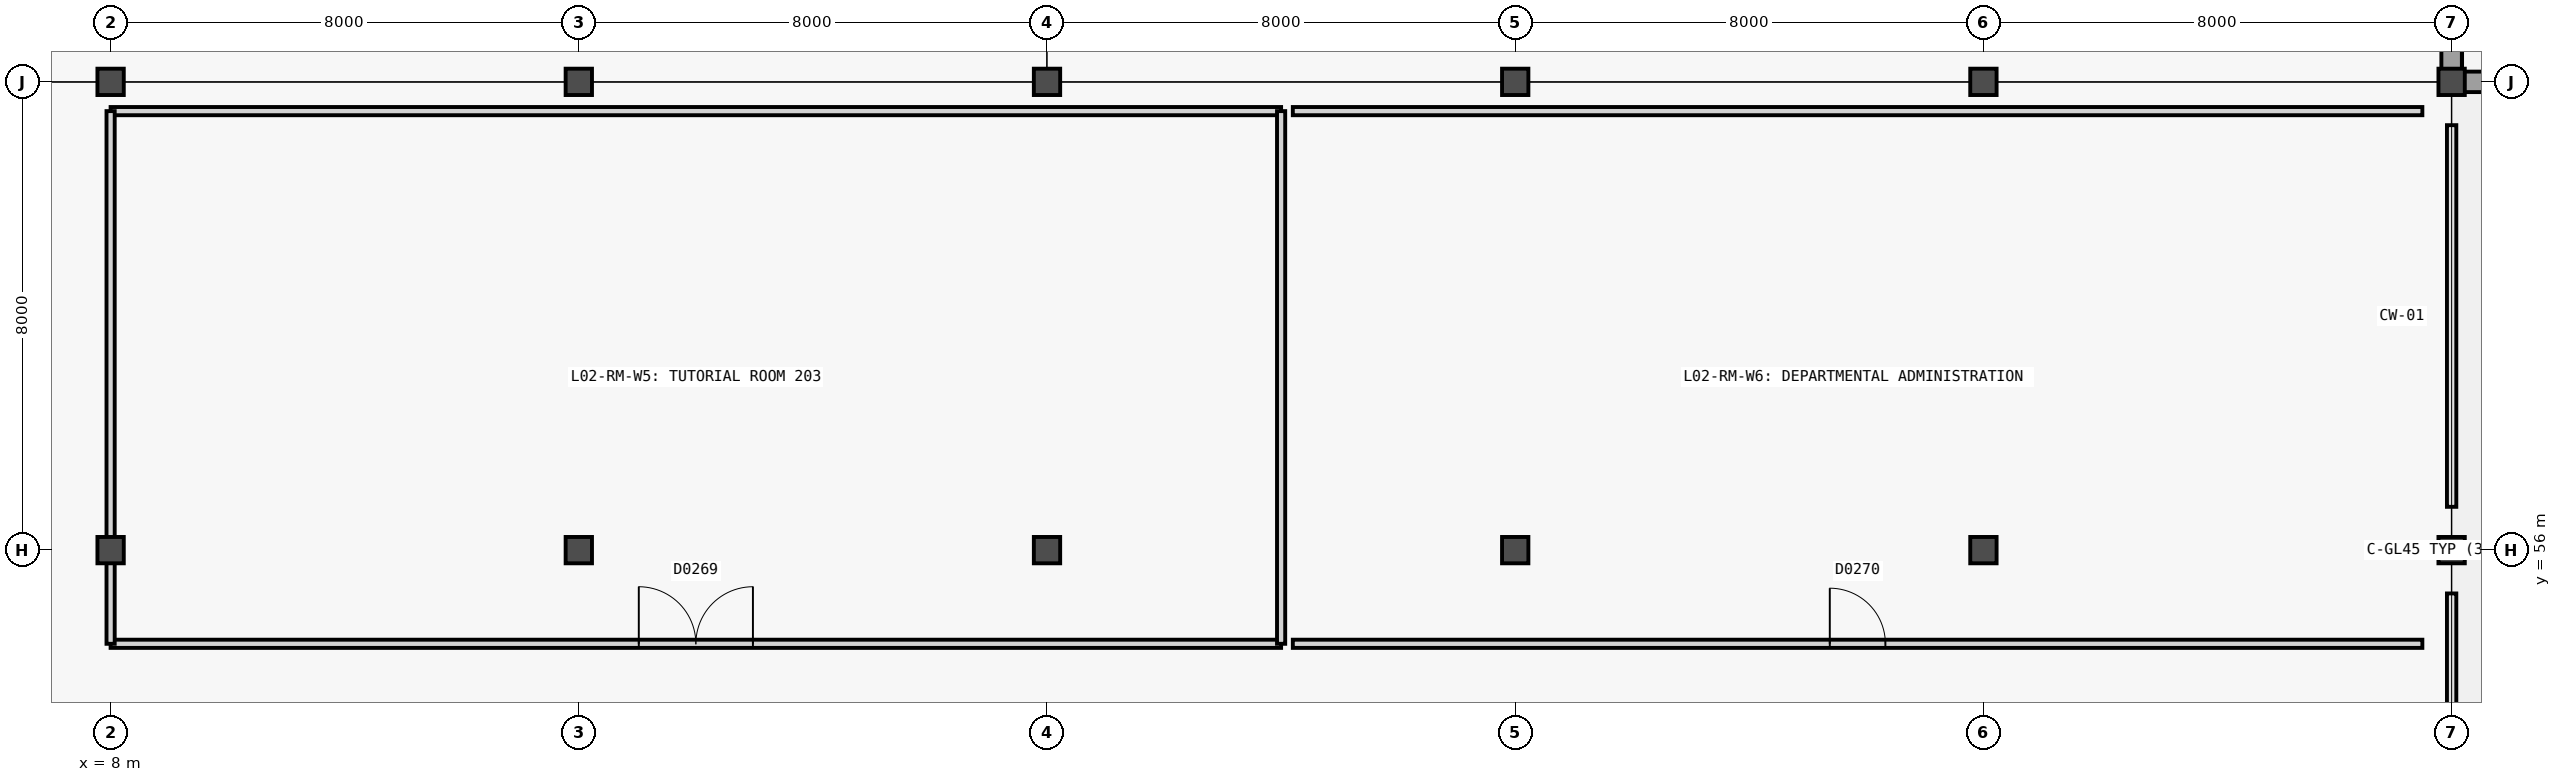
"""IFC4 building model, lengths in metres.
Left out: names, types, materials, properties, quantities, classifications, styles, units other than length and angle.
Written with IfcOpenShell. Run it as: python <this file> out.ifc"""

import sys

from ifc_helpers import new_model, si_unit, direction, frame, frame_2d, origin, origin_2d, place, context, subcontext, project, spatial, rectangle, extrude, element, fill, save


model = new_model("IFC4")
c1 = context("Model", 3, precision=1e-05, world=origin(), true_north=direction((0.0, 1.0)))
c2 = subcontext(c1, "Body", "Model", "MODEL_VIEW")
j1 = project(units=[si_unit("LENGTHUNIT", "METRE"), si_unit("PLANEANGLEUNIT", "RADIAN")], contexts=[c1])
p1 = place(None, origin())
s1 = spatial("IfcSite", under=j1, at=p1, CompositionType="ELEMENT")
p2 = place(p1, origin())
s2 = spatial("IfcBuilding", under=s1, at=p2, CompositionType="ELEMENT")
p3 = place(p2, frame((0.0, 0.0, 10.2)))
s3 = spatial("IfcBuildingStorey", under=s2, at=p3, CompositionType="ELEMENT", Elevation=10.2)
for number, where, z_axis, x_axis in (
    (1, (8.0, 56.0, 0.0), (0.0, 0.0, 1.0), (1.0, 0.0, 0.0)),
    (2, (8.0, 64.0, 0.0), (0.0, 0.0, 1.0), (1.0, 0.0, 0.0)),
    (3, (16.0, 56.0, 0.0), (0.0, 0.0, 1.0), (1.0, 0.0, 0.0)),
    (4, (16.0, 64.0, 0.0), (0.0, 0.0, 1.0), (1.0, 0.0, 0.0)),
    (5, (24.0, 56.0, 0.0), (0.0, 0.0, 1.0), (1.0, 0.0, 0.0)),
    (6, (24.0, 64.0, 0.0), (0.0, 0.0, 1.0), (1.0, 0.0, 0.0)),
    (7, (32.0, 56.0, 0.0), (0.0, 0.0, 1.0), (1.0, 0.0, 0.0)),
    (8, (32.0, 64.0, 0.0), (0.0, 0.0, 1.0), (1.0, 0.0, 0.0)),
    (9, (40.0, 56.0, 0.0), (0.0, 0.0, 1.0), (1.0, 0.0, 0.0)),
    (10, (40.0, 64.0, 0.0), (0.0, 0.0, 1.0), (1.0, 0.0, 0.0)),
    (11, (48.0, 56.0, 0.0), (0.0, 0.0, 1.0), (1.0, 0.0, 0.0)),
    (12, (48.0, 64.0, 0.0), (0.0, 0.0, 1.0), (1.0, 0.0, 0.0)),
):
    element("IfcColumn", number, at=place(p3, frame(where, z_axis=z_axis, x_axis=x_axis)), inside=s3, PredefinedType="COLUMN", context=c2, shape_type="SweptSolid", body=[
        extrude(rectangle(XDim=0.45, YDim=0.45, at=origin_2d()), origin(), (0.0, 0.0, 1.0), 4.2),
    ])
p4 = place(p3, frame((48.0, 64.0, 0.0), z_axis=(0.0, 0.0, 1.0), x_axis=(1.0, 0.0, 0.0)))
e13 = element("IfcWall", 13, at=p4, inside=s3, PredefinedType="SHEAR", context=c2, shape_type="SweptSolid", body=[
    extrude(rectangle(XDim=8.0, YDim=0.35, at=frame_2d((4.0, 0.0))), origin(), (0.0, 0.0, 1.0), 4.2),
])
p5 = place(p3, frame((48.0, 64.0, 0.0), z_axis=(0.0, 0.0, 1.0), x_axis=(0.0, 1.0, 0.0)))
e14 = element("IfcWall", 14, at=p5, inside=s3, PredefinedType="SHEAR", context=c2, shape_type="SweptSolid", body=[
    extrude(rectangle(XDim=8.4, YDim=0.35, at=frame_2d((4.2, 0.0))), origin(), (0.0, 0.0, 1.0), 4.2),
])
p6 = place(p3, frame((8.0, 54.4, 0.0), z_axis=(0.0, 0.0, 1.0), x_axis=(1.0, 0.0, 0.0)))
e15 = element("IfcWall", 15, at=p6, inside=s3, PredefinedType="PARTITIONING", context=c2, shape_type="SweptSolid", body=[
    extrude(rectangle(XDim=20.0, YDim=0.14, at=frame_2d((10.0, 0.0))), origin(), (0.0, 0.0, 1.0), 3.94),
])
p7 = place(p6, frame((9.025, 0.0, 0.0)))
e16 = element("IfcOpeningElement", 16, at=p7, cuts=e15, PredefinedType="OPENING", context=c2, shape_type="SweptSolid", body=[
    extrude(rectangle(XDim=1.95, YDim=2.35, at=frame_2d((0.975, 1.175))), frame((0.0, 0.08, 0.0), z_axis=(0.0, -1.0, 0.0), x_axis=(1.0, 0.0, 0.0)), (0.0, 0.0, 1.0), 0.16),
])
p8 = place(p3, frame((8.0, 63.5, 0.0), z_axis=(0.0, 0.0, 1.0), x_axis=(1.0, 0.0, 0.0)))
e17 = element("IfcWall", 17, at=p8, inside=s3, PredefinedType="PARTITIONING", context=c2, shape_type="SweptSolid", body=[
    extrude(rectangle(XDim=20.0, YDim=0.14, at=frame_2d((10.0, 0.0))), origin(), (0.0, 0.0, 1.0), 3.94),
])
p9 = place(p3, frame((8.0, 54.4, 0.0), z_axis=(0.0, 0.0, 1.0), x_axis=(0.0, 1.0, 0.0)))
e18 = element("IfcWall", 18, at=p9, inside=s3, PredefinedType="PARTITIONING", context=c2, shape_type="SweptSolid", body=[
    extrude(rectangle(XDim=9.1, YDim=0.14, at=frame_2d((4.55, 0.0))), origin(), (0.0, 0.0, 1.0), 3.36),
])
p10 = place(p3, frame((28.0, 54.4, 0.0), z_axis=(0.0, 0.0, 1.0), x_axis=(0.0, 1.0, 0.0)))
e19 = element("IfcWall", 19, at=p10, inside=s3, PredefinedType="PARTITIONING", context=c2, shape_type="SweptSolid", body=[
    extrude(rectangle(XDim=9.1, YDim=0.14, at=frame_2d((4.55, 0.0))), origin(), (0.0, 0.0, 1.0), 3.52),
])
p11 = place(p3, frame((28.2, 54.4, 0.0), z_axis=(0.0, 0.0, 1.0), x_axis=(1.0, 0.0, 0.0)))
e20 = element("IfcWall", 20, at=p11, inside=s3, PredefinedType="PARTITIONING", context=c2, shape_type="SweptSolid", body=[
    extrude(rectangle(XDim=19.3, YDim=0.14, at=frame_2d((9.65, 0.0))), origin(), (0.0, 0.0, 1.0), 3.94),
])
p12 = place(p11, frame((9.175, 0.0, 0.0)))
e21 = element("IfcOpeningElement", 21, at=p12, cuts=e20, PredefinedType="OPENING", context=c2, shape_type="SweptSolid", body=[
    extrude(rectangle(XDim=0.95, YDim=2.1, at=frame_2d((0.475, 1.05))), frame((0.0, 0.08, 0.0), z_axis=(0.0, -1.0, 0.0), x_axis=(1.0, 0.0, 0.0)), (0.0, 0.0, 1.0), 0.16),
])
p13 = place(p3, frame((28.2, 63.5, 0.0), z_axis=(0.0, 0.0, 1.0), x_axis=(1.0, 0.0, 0.0)))
e22 = element("IfcWall", 22, at=p13, inside=s3, PredefinedType="PARTITIONING", context=c2, shape_type="SweptSolid", body=[
    extrude(rectangle(XDim=19.3, YDim=0.14, at=frame_2d((9.65, 0.0))), origin(), (0.0, 0.0, 1.0), 3.94),
])
p14 = place(p7, origin())
e23 = element("IfcDoor", 23, at=p14, inside=s3, OperationType="DOUBLE_DOOR_SINGLE_SWING", PredefinedType="DOOR", context=c2, shape_type="SweptSolid", body=[
    extrude(rectangle(XDim=1.95, YDim=2.35, at=frame_2d((0.975, 1.175))), frame((0.0, 0.025, 0.0), z_axis=(0.0, -1.0, 0.0), x_axis=(1.0, 0.0, 0.0)), (0.0, 0.0, 1.0), 0.05),
])
fill(e16, e23)
p15 = place(p12, origin())
e24 = element("IfcDoor", 24, at=p15, inside=s3, OperationType="SINGLE_SWING_LEFT", PredefinedType="DOOR", context=c2, shape_type="SweptSolid", body=[
    extrude(rectangle(XDim=0.95, YDim=2.1, at=frame_2d((0.475, 1.05))), frame((0.0, 0.025, 0.0), z_axis=(0.0, -1.0, 0.0), x_axis=(1.0, 0.0, 0.0)), (0.0, 0.0, 1.0), 0.05),
])
fill(e21, e24)
save(model, sys.argv[1])
